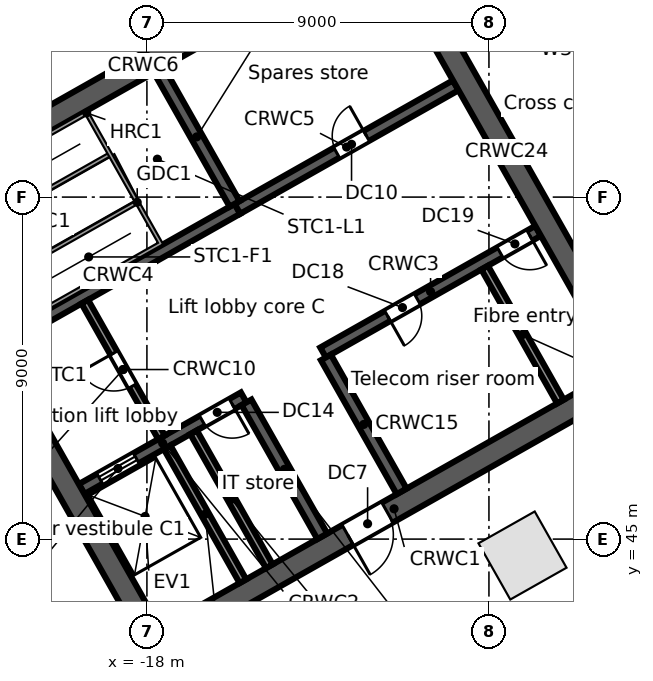
"""IFC4 building model, lengths in metres.
Left out: names, types, materials, properties, quantities, classifications, styles, units other than length and angle.
Written with IfcOpenShell. Run it as: python <this file> out.ifc"""

import sys

from ifc_helpers import new_model, si_unit, direction, frame, frame_2d, origin, origin_2d, place, context, subcontext, project, spatial, rectangle, extrude, element, fill, save


model = new_model("IFC4")
c1 = context("Model", 3, precision=1e-05, world=origin(), true_north=direction((0.0, 1.0)))
c2 = subcontext(c1, "Body", "Model", "MODEL_VIEW")
j1 = project(units=[si_unit("LENGTHUNIT", "METRE"), si_unit("PLANEANGLEUNIT", "RADIAN")], contexts=[c1])
p1 = place(None, origin())
s1 = spatial("IfcSite", under=j1, at=p1, CompositionType="ELEMENT")
p2 = place(p1, origin())
s2 = spatial("IfcBuilding", under=s1, at=p2, CompositionType="ELEMENT")
p3 = place(p2, frame((0.0, 0.0, 6.5)))
s3 = spatial("IfcBuildingStorey", under=s2, at=p3, CompositionType="ELEMENT", Elevation=6.5)
p4 = place(p3, frame((-8.117, 44.568, 0.0), z_axis=(0.0, 0.0, 1.0), x_axis=(0.87035569594, 0.492423560103, 0.0)))
e1 = element("IfcColumn", 1, at=p4, inside=s3, PredefinedType="COLUMN", context=c2, shape_type="SweptSolid", body=[
    extrude(rectangle(XDim=1.7, YDim=1.7, at=origin_2d()), origin(), (0.0, 0.0, 1.0), 5.0),
])
p5 = place(p3, frame((-63.707, 41.701, 0.0), z_axis=(0.0, 0.0, 1.0), x_axis=(0.870355510268, 0.492423888277, 0.0)))
e2 = element("IfcWall", 2, at=p5, inside=s3, PredefinedType="STANDARD", context=c2, shape_type="SweptSolid", body=[
    extrude(rectangle(XDim=67.903, YDim=0.3, at=frame_2d((33.952, 0.0))), origin(), (0.0, 0.0, 1.0), 4.65),
])
p6 = place(p3, frame((-18.024, 42.104, 0.0), z_axis=(0.0, 0.0, 1.0), x_axis=(0.870360574057, 0.492414937962, 0.0)))
e3 = element("IfcWall", 3, at=p6, inside=s3, PredefinedType="SOLIDWALL", context=c2, shape_type="SweptSolid", body=[
    extrude(rectangle(XDim=15.0, YDim=0.6, at=frame_2d((7.5, 0.0))), origin(), (0.0, 0.0, 1.0), 4.65),
])
p7 = place(p6, frame((6.1, 0.0, 0.0)))
e4 = element("IfcOpeningElement", 4, at=p7, cuts=e3, PredefinedType="OPENING", context=c2, shape_type="SweptSolid", body=[
    extrude(rectangle(XDim=1.2, YDim=2.1, at=frame_2d((0.6, 1.05))), frame((0.0, 0.31, 0.0), z_axis=(0.0, -1.0, 0.0), x_axis=(1.0, 0.0, 0.0)), (0.0, 0.0, 1.0), 0.62),
])
p8 = place(p3, frame((-19.718, 46.316, 0.0), z_axis=(0.0, 0.0, 1.0), x_axis=(0.870353963862, 0.492426621528, 0.0)))
e5 = element("IfcWall", 5, at=p8, inside=s3, PredefinedType="SOLIDWALL", context=c2, shape_type="SweptSolid", body=[
    extrude(rectangle(XDim=4.9, YDim=0.3, at=frame_2d((2.45, 0.0))), origin(), (0.0, 0.0, 1.0), 4.65),
])
p9 = place(p8, frame((0.55, 0.0, 0.0)))
e6 = element("IfcOpeningElement", 6, at=p9, cuts=e5, PredefinedType="OPENING", context=c2, shape_type="SweptSolid", body=[
    extrude(rectangle(XDim=1.1, YDim=2.1, at=frame_2d((0.55, 1.05))), frame((0.0, 0.16, 0.0), z_axis=(0.0, -1.0, 0.0), x_axis=(1.0, 0.0, 0.0)), (0.0, 0.0, 1.0), 0.32),
])
p10 = place(p8, frame((3.65, 0.0, 0.0)))
e7 = element("IfcOpeningElement", 7, at=p10, cuts=e5, PredefinedType="OPENING", context=c2, shape_type="SweptSolid", body=[
    extrude(rectangle(XDim=0.9, YDim=2.1, at=frame_2d((0.45, 1.05))), frame((0.0, 0.16, 0.0), z_axis=(0.0, -1.0, 0.0), x_axis=(1.0, 0.0, 0.0)), (0.0, 0.0, 1.0), 0.32),
])
p11 = place(p3, frame((-13.365, 49.911, 0.0), z_axis=(0.0, 0.0, 1.0), x_axis=(0.870340995471, 0.49244954219, 0.0)))
e8 = element("IfcWall", 8, at=p11, inside=s3, PredefinedType="SOLIDWALL", context=c2, shape_type="SweptSolid", body=[
    extrude(rectangle(XDim=6.5, YDim=0.3, at=frame_2d((3.25, 0.0))), origin(), (0.0, 0.0, 1.0), 4.65),
])
p12 = place(p11, frame((1.95, 0.0, 0.0)))
e9 = element("IfcOpeningElement", 9, at=p12, cuts=e8, PredefinedType="OPENING", context=c2, shape_type="SweptSolid", body=[
    extrude(rectangle(XDim=0.9, YDim=2.1, at=frame_2d((0.45, 1.05))), frame((0.0, 0.16, 0.0), z_axis=(0.0, -1.0, 0.0), x_axis=(1.0, 0.0, 0.0)), (0.0, 0.0, 1.0), 0.32),
])
p13 = place(p11, frame((5.35, 0.0, 0.0)))
e10 = element("IfcOpeningElement", 10, at=p13, cuts=e8, PredefinedType="OPENING", context=c2, shape_type="SweptSolid", body=[
    extrude(rectangle(XDim=0.9, YDim=2.1, at=frame_2d((0.45, 1.05))), frame((0.0, 0.16, 0.0), z_axis=(0.0, -1.0, 0.0), x_axis=(1.0, 0.0, 0.0)), (0.0, 0.0, 1.0), 0.32),
])
p14 = place(p3, frame((-21.885, 50.146, 0.0), z_axis=(0.0, 0.0, 1.0), x_axis=(0.870359411463, 0.492416992881, 0.0)))
e11 = element("IfcWall", 11, at=p14, inside=s3, PredefinedType="SOLIDWALL", context=c2, shape_type="SweptSolid", body=[
    extrude(rectangle(XDim=7.2, YDim=0.3, at=frame_2d((3.6, 0.0))), origin(), (0.0, 0.0, 1.0), 4.65),
])
p15 = place(p14, frame((0.2, 0.0, 0.0)))
e12 = element("IfcOpeningElement", 12, at=p15, cuts=e11, PredefinedType="OPENING", context=c2, shape_type="SweptSolid", body=[
    extrude(rectangle(XDim=1.0, YDim=2.1, at=frame_2d((0.5, 1.05))), frame((0.0, 0.16, 0.0), z_axis=(0.0, -1.0, 0.0), x_axis=(1.0, 0.0, 0.0)), (0.0, 0.0, 1.0), 0.32),
])
p16 = place(p3, frame((-15.618, 53.691, 0.0), z_axis=(0.0, 0.0, 1.0), x_axis=(0.870356769198, 0.492421663121, 0.0)))
e13 = element("IfcWall", 13, at=p16, inside=s3, PredefinedType="SOLIDWALL", context=c2, shape_type="SweptSolid", body=[
    extrude(rectangle(XDim=6.6, YDim=0.3, at=frame_2d((3.3, 0.0))), origin(), (0.0, 0.0, 1.0), 4.65),
])
p17 = place(p16, frame((3.0, 0.0, 0.0)))
e14 = element("IfcOpeningElement", 14, at=p17, cuts=e13, PredefinedType="OPENING", context=c2, shape_type="SweptSolid", body=[
    extrude(rectangle(XDim=0.9, YDim=2.1, at=frame_2d((0.45, 1.05))), frame((0.0, 0.16, 0.0), z_axis=(0.0, -1.0, 0.0), x_axis=(1.0, 0.0, 0.0)), (0.0, 0.0, 1.0), 0.32),
])
p18 = place(p3, frame((-24.623, 53.767, 0.0), z_axis=(0.0, 0.0, 1.0), x_axis=(0.870356627484, 0.492421913601, 0.0)))
e15 = element("IfcWall", 15, at=p18, inside=s3, PredefinedType="SOLIDWALL", context=c2, shape_type="SweptSolid", body=[
    extrude(rectangle(XDim=15.0, YDim=0.6, at=frame_2d((7.5, 0.0))), origin(), (0.0, 0.0, 1.0), 4.65),
])
p19 = place(p3, frame((-24.214, 53.654, 0.0), z_axis=(0.0, 0.0, 1.0), x_axis=(0.492441221355, -0.870345703448, 0.0)))
e16 = element("IfcWall", 16, at=p19, inside=s3, PredefinedType="SOLIDWALL", context=c2, shape_type="SweptSolid", body=[
    extrude(rectangle(XDim=12.8, YDim=0.6, at=frame_2d((6.4, 0.0))), origin(), (0.0, 0.0, 1.0), 4.65),
])
p20 = place(p3, frame((-17.469, 47.417, 0.0), z_axis=(0.0, 0.0, 1.0), x_axis=(0.492440575896, -0.870346068648, 0.0)))
e17 = element("IfcWall", 17, at=p20, inside=s3, PredefinedType="SOLIDWALL", context=c2, shape_type="SweptSolid", body=[
    extrude(rectangle(XDim=4.05, YDim=0.2, at=frame_2d((2.025, 0.0))), origin(), (0.0, 0.0, 1.0), 4.65),
])
p21 = place(p3, frame((-19.635, 51.246, 0.0), z_axis=(0.0, 0.0, 1.0), x_axis=(0.492408451753, -0.87036424366, 0.0)))
e18 = element("IfcWall", 18, at=p21, inside=s3, PredefinedType="PARTITIONING", context=c2, shape_type="SweptSolid", body=[
    extrude(rectangle(XDim=4.1, YDim=0.2, at=frame_2d((2.05, 0.0))), origin(), (0.0, 0.0, 1.0), 4.65),
])
p22 = place(p21, frame((1.55, 0.0, 0.0)))
e19 = element("IfcOpeningElement", 19, at=p22, cuts=e18, PredefinedType="OPENING", context=c2, shape_type="SweptSolid", body=[
    extrude(rectangle(XDim=1.0, YDim=2.1, at=frame_2d((0.5, 1.05))), frame((0.0, 0.11, 0.0), z_axis=(0.0, -1.0, 0.0), x_axis=(1.0, 0.0, 0.0)), (0.0, 0.0, 1.0), 0.22),
])
p23 = place(p3, frame((-16.772, 47.811, 0.0), z_axis=(0.0, 0.0, 1.0), x_axis=(0.492440575896, -0.870346068648, 0.0)))
e20 = element("IfcWall", 20, at=p23, inside=s3, PredefinedType="SOLIDWALL", context=c2, shape_type="SweptSolid", body=[
    extrude(rectangle(XDim=4.05, YDim=0.2, at=frame_2d((2.025, 0.0))), origin(), (0.0, 0.0, 1.0), 4.65),
])
p24 = place(p3, frame((-15.379, 48.599, 0.0), z_axis=(0.0, 0.0, 1.0), x_axis=(0.492394910396, -0.870371904542, 0.0)))
e21 = element("IfcWall", 21, at=p24, inside=s3, PredefinedType="SOLIDWALL", context=c2, shape_type="SweptSolid", body=[
    extrude(rectangle(XDim=4.05, YDim=0.3, at=frame_2d((2.025, 0.0))), origin(), (0.0, 0.0, 1.0), 4.65),
])
p25 = place(p3, frame((-17.686, 57.347, 0.0), z_axis=(0.0, 0.0, 1.0), x_axis=(0.492420746998, -0.870357287513, 0.0)))
e22 = element("IfcWall", 22, at=p25, inside=s3, PredefinedType="SOLIDWALL", context=c2, shape_type="SweptSolid", body=[
    extrude(rectangle(XDim=4.05, YDim=0.3, at=frame_2d((2.025, 0.0))), origin(), (0.0, 0.0, 1.0), 4.65),
])
p26 = place(p3, frame((-13.291, 49.781, 0.0), z_axis=(0.0, 0.0, 1.0), x_axis=(0.492394910396, -0.870371904542, 0.0)))
e23 = element("IfcWall", 23, at=p26, inside=s3, PredefinedType="SOLIDWALL", context=c2, shape_type="SweptSolid", body=[
    extrude(rectangle(XDim=4.05, YDim=0.3, at=frame_2d((2.025, 0.0))), origin(), (0.0, 0.0, 1.0), 4.65),
])
p27 = place(p3, frame((-9.113, 52.144, 0.0), z_axis=(0.0, 0.0, 1.0), x_axis=(0.492394910396, -0.870371904542, 0.0)))
e24 = element("IfcWall", 24, at=p27, inside=s3, PredefinedType="PARTITIONING", context=c2, shape_type="SweptSolid", body=[
    extrude(rectangle(XDim=4.05, YDim=0.2, at=frame_2d((2.025, 0.0))), origin(), (0.0, 0.0, 1.0), 4.65),
])
p28 = place(p3, frame((-11.681, 60.744, 0.0), z_axis=(0.0, 0.0, 1.0), x_axis=(0.492426772896, -0.870353878221, 0.0)))
e25 = element("IfcWall", 25, at=p28, inside=s3, PredefinedType="SOLIDWALL", context=c2, shape_type="SweptSolid", body=[
    extrude(rectangle(XDim=12.8, YDim=0.6, at=frame_2d((6.4, 0.0))), origin(), (0.0, 0.0, 1.0), 4.65),
])
p29 = place(p3, frame((-10.254, 66.263, 0.0), z_axis=(0.0, 0.0, 1.0), x_axis=(0.492411664329, -0.870362426138, 0.0)))
e26 = element("IfcWall", 26, at=p29, inside=s3, PredefinedType="PARTITIONING", context=c2, shape_type="SweptSolid", body=[
    extrude(rectangle(XDim=17.0, YDim=0.125, at=frame_2d((8.5, 0.0))), origin(), (0.0, 0.0, 1.0), 3.712),
])
p30 = place(p29, frame((7.95, 0.0, 0.0)))
e27 = element("IfcOpeningElement", 27, at=p30, cuts=e26, PredefinedType="OPENING", context=c2, shape_type="SweptSolid", body=[
    extrude(rectangle(XDim=0.9, YDim=2.1, at=frame_2d((0.45, 1.05))), frame((0.0, 0.073, 0.0), z_axis=(0.0, -1.0, 0.0), x_axis=(1.0, 0.0, 0.0)), (0.0, 0.0, 1.0), 0.145),
])
p31 = place(p9, origin())
e28 = element("IfcDoor", 28, at=p31, inside=s3, OperationType="DOUBLE_DOOR_SLIDING", PredefinedType="DOOR", context=c2, shape_type="SweptSolid", body=[
    extrude(rectangle(XDim=1.1, YDim=2.1, at=frame_2d((0.55, 1.05))), frame((0.0, 0.025, 0.0), z_axis=(0.0, -1.0, 0.0), x_axis=(1.0, 0.0, 0.0)), (0.0, 0.0, 1.0), 0.05),
])
fill(e6, e28)
p32 = place(p22, frame((1.0, 0.0, 0.0), z_axis=(0.0, 0.0, 1.0), x_axis=(-1.0, 0.0, 0.0)))
e29 = element("IfcDoor", 29, at=p32, inside=s3, OperationType="SINGLE_SWING_RIGHT", PredefinedType="DOOR", context=c2, shape_type="SweptSolid", body=[
    extrude(rectangle(XDim=1.0, YDim=2.1, at=frame_2d((0.5, 1.05))), frame((0.0, 0.025, 0.0), z_axis=(0.0, -1.0, 0.0), x_axis=(1.0, 0.0, 0.0)), (0.0, 0.0, 1.0), 0.05),
])
fill(e19, e29)
p33 = place(p7, frame((1.2, 0.0, 0.0), z_axis=(0.0, 0.0, 1.0), x_axis=(-1.0, 0.0, 0.0)))
e30 = element("IfcDoor", 30, at=p33, inside=s3, OperationType="SINGLE_SWING_RIGHT", PredefinedType="DOOR", context=c2, shape_type="SweptSolid", body=[
    extrude(rectangle(XDim=1.2, YDim=2.1, at=frame_2d((0.6, 1.05))), frame((0.0, 0.025, 0.0), z_axis=(0.0, -1.0, 0.0), x_axis=(1.0, 0.0, 0.0)), (0.0, 0.0, 1.0), 0.05),
])
fill(e4, e30)
p34 = place(p17, origin())
e31 = element("IfcDoor", 31, at=p34, inside=s3, OperationType="SINGLE_SWING_RIGHT", PredefinedType="DOOR", context=c2, shape_type="SweptSolid", body=[
    extrude(rectangle(XDim=0.9, YDim=2.1, at=frame_2d((0.45, 1.05))), frame((0.0, 0.025, 0.0), z_axis=(0.0, -1.0, 0.0), x_axis=(1.0, 0.0, 0.0)), (0.0, 0.0, 1.0), 0.05),
])
fill(e14, e31)
p35 = place(p10, frame((0.9, 0.0, 0.0), z_axis=(0.0, 0.0, 1.0), x_axis=(-1.0, 0.0, 0.0)))
e32 = element("IfcDoor", 32, at=p35, inside=s3, OperationType="SINGLE_SWING_LEFT", PredefinedType="DOOR", context=c2, shape_type="SweptSolid", body=[
    extrude(rectangle(XDim=0.9, YDim=2.1, at=frame_2d((0.45, 1.05))), frame((0.0, 0.025, 0.0), z_axis=(0.0, -1.0, 0.0), x_axis=(1.0, 0.0, 0.0)), (0.0, 0.0, 1.0), 0.05),
])
fill(e7, e32)
p36 = place(p12, frame((0.9, 0.0, 0.0), z_axis=(0.0, 0.0, 1.0), x_axis=(-1.0, 0.0, 0.0)))
e33 = element("IfcDoor", 33, at=p36, inside=s3, OperationType="SINGLE_SWING_RIGHT", PredefinedType="DOOR", context=c2, shape_type="SweptSolid", body=[
    extrude(rectangle(XDim=0.9, YDim=2.1, at=frame_2d((0.45, 1.05))), frame((0.0, 0.025, 0.0), z_axis=(0.0, -1.0, 0.0), x_axis=(1.0, 0.0, 0.0)), (0.0, 0.0, 1.0), 0.05),
])
fill(e9, e33)
p37 = place(p13, frame((0.9, 0.0, 0.0), z_axis=(0.0, 0.0, 1.0), x_axis=(-1.0, 0.0, 0.0)))
e34 = element("IfcDoor", 34, at=p37, inside=s3, OperationType="SINGLE_SWING_LEFT", PredefinedType="DOOR", context=c2, shape_type="SweptSolid", body=[
    extrude(rectangle(XDim=0.9, YDim=2.1, at=frame_2d((0.45, 1.05))), frame((0.0, 0.025, 0.0), z_axis=(0.0, -1.0, 0.0), x_axis=(1.0, 0.0, 0.0)), (0.0, 0.0, 1.0), 0.05),
])
fill(e10, e34)
save(model, sys.argv[1])
